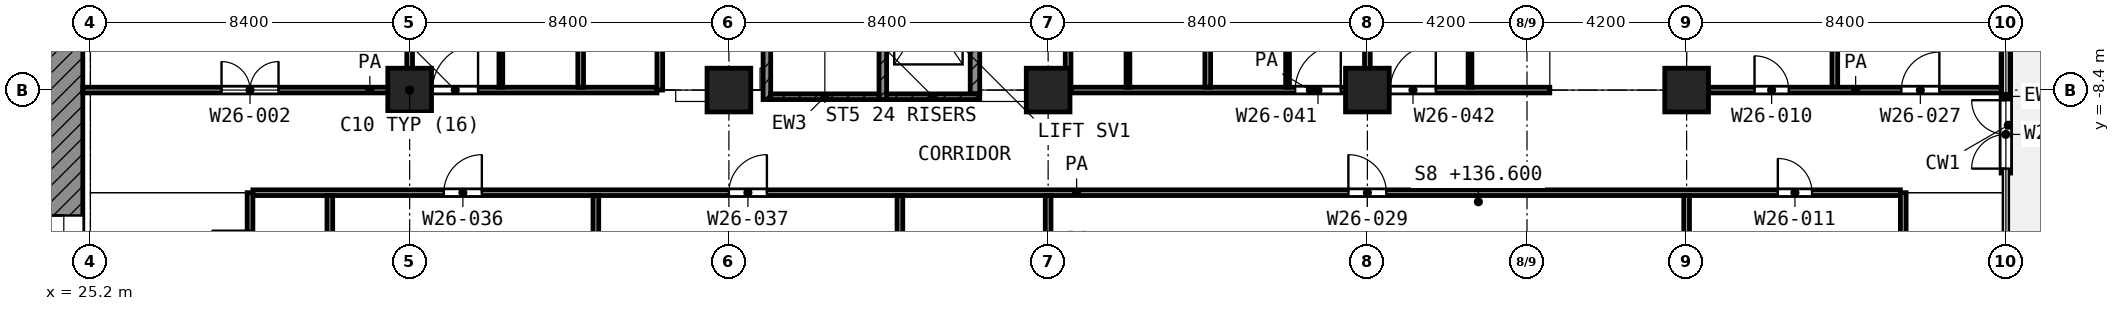
"""IFC4 building model, lengths in metres.
Left out: names, types, materials, properties, quantities, classifications, styles, units other than length and angle.
Written with IfcOpenShell. Run it as: python <this file> out.ifc"""

import sys

from ifc_helpers import new_model, si_unit, direction, frame, frame_2d, origin, origin_2d, place, context, subcontext, project, spatial, rectangle, extrude, element, fill, save


model = new_model("IFC4")
c1 = context("Model", 3, precision=1e-05, world=origin(), true_north=direction((0.0, 1.0)))
c2 = subcontext(c1, "Body", "Model", "MODEL_VIEW")
j1 = project(units=[si_unit("LENGTHUNIT", "METRE"), si_unit("PLANEANGLEUNIT", "RADIAN")], contexts=[c1])
p1 = place(None, origin())
s1 = spatial("IfcSite", under=j1, at=p1, CompositionType="ELEMENT")
p2 = place(p1, origin())
s2 = spatial("IfcBuilding", under=s1, at=p2, CompositionType="ELEMENT")
p3 = place(p2, frame((0.0, 0.0, 136.6)))
s3 = spatial("IfcBuildingStorey", under=s2, at=p3, CompositionType="ELEMENT", Elevation=136.6)
for number, where, z_axis, x_axis in (
    (1, (33.6, -8.4, 0.0), (0.0, 0.0, 1.0), (1.0, 0.0, 0.0)),
    (2, (42.0, -8.4, 0.0), (0.0, 0.0, 1.0), (1.0, 0.0, 0.0)),
    (3, (50.4, -8.4, 0.0), (0.0, 0.0, 1.0), (1.0, 0.0, 0.0)),
    (4, (58.8, -8.4, 0.0), (0.0, 0.0, 1.0), (1.0, 0.0, 0.0)),
    (5, (67.2, -8.4, 0.0), (0.0, 0.0, 1.0), (1.0, 0.0, 0.0)),
):
    element("IfcColumn", number, at=place(p3, frame(where, z_axis=z_axis, x_axis=x_axis)), inside=s3, PredefinedType="COLUMN", context=c2, shape_type="SweptSolid", body=[
        extrude(rectangle(XDim=1.15, YDim=1.15, at=origin_2d()), origin(), (0.0, 0.0, 1.0), 4.2),
    ])
p4 = place(p3, frame((75.6, -10.583, 0.0), z_axis=(0.0, 0.0, 1.0), x_axis=(0.0, 1.0, 0.0)))
e6 = element("IfcWall", 6, at=p4, inside=s3, PredefinedType="SOLIDWALL", context=c2, shape_type="SweptSolid", body=[
    extrude(rectangle(XDim=4.033, YDim=0.25, at=frame_2d((2.017, 0.0))), origin(), (0.0, 0.0, 1.0), 3.48),
])
p5 = place(p4, frame((0.117, 0.0, 0.0)))
e7 = element("IfcOpeningElement", 7, at=p5, cuts=e6, PredefinedType="OPENING", context=c2, shape_type="SweptSolid", body=[
    extrude(rectangle(XDim=1.8, YDim=2.1, at=frame_2d((0.9, 1.05))), frame((0.0, 0.135, 0.0), z_axis=(0.0, -1.0, 0.0), x_axis=(1.0, 0.0, 0.0)), (0.0, 0.0, 1.0), 0.27),
])
p6 = place(p3, frame((24.5, -24.0, 0.0), z_axis=(0.0, 0.0, 1.0), x_axis=(0.0, 1.0, 0.0)))
e8 = element("IfcWall", 8, at=p6, inside=s3, PredefinedType="SHEAR", context=c2, shape_type="SweptSolid", body=[
    extrude(rectangle(XDim=18.6, YDim=1.0, at=frame_2d((9.3, 0.0))), origin(), (0.0, 0.0, 1.0), 3.6),
])
p7 = place(p6, frame((10.5, 0.0, 0.0)))
e9 = element("IfcOpeningElement", 9, at=p7, cuts=e8, PredefinedType="OPENING", context=c2, shape_type="SweptSolid", body=[
    extrude(rectangle(XDim=1.8, YDim=2.1, at=frame_2d((0.9, 1.05))), frame((0.0, 0.51, 0.0), z_axis=(0.0, -1.0, 0.0), x_axis=(1.0, 0.0, 0.0)), (0.0, 0.0, 1.0), 1.02),
])
p8 = place(p3, frame((43.0, -8.65, 0.0), z_axis=(0.0, 0.0, 1.0), x_axis=(0.0, 1.0, 0.0)))
e10 = element("IfcWall", 10, at=p8, inside=s3, PredefinedType="SHEAR", context=c2, shape_type="SweptSolid", body=[
    extrude(rectangle(XDim=8.35, YDim=0.2, at=frame_2d((4.175, 0.0))), origin(), (0.0, 0.0, 1.0), 3.6),
])
p9 = place(p8, frame((7.0, 0.0, 0.0)))
e11 = element("IfcOpeningElement", 11, at=p9, cuts=e10, PredefinedType="OPENING", context=c2, shape_type="SweptSolid", body=[
    extrude(rectangle(XDim=1.1, YDim=2.1, at=frame_2d((0.55, 1.05))), frame((0.0, 0.11, 0.0), z_axis=(0.0, -1.0, 0.0), x_axis=(1.0, 0.0, 0.0)), (0.0, 0.0, 1.0), 0.22),
])
p10 = place(p3, frame((46.05, -8.65, 0.0), z_axis=(0.0, 0.0, 1.0), x_axis=(0.0, 1.0, 0.0)))
e12 = element("IfcWall", 12, at=p10, inside=s3, PredefinedType="SHEAR", context=c2, shape_type="SweptSolid", body=[
    extrude(rectangle(XDim=8.35, YDim=0.2, at=frame_2d((4.175, 0.0))), origin(), (0.0, 0.0, 1.0), 3.6),
])
p11 = place(p10, frame((7.0, 0.0, 0.0)))
e13 = element("IfcOpeningElement", 13, at=p11, cuts=e12, PredefinedType="OPENING", context=c2, shape_type="SweptSolid", body=[
    extrude(rectangle(XDim=1.1, YDim=2.1, at=frame_2d((0.55, 1.05))), frame((0.0, 0.11, 0.0), z_axis=(0.0, -1.0, 0.0), x_axis=(1.0, 0.0, 0.0)), (0.0, 0.0, 1.0), 0.22),
])
p12 = place(p3, frame((43.1, -8.575, 0.0), z_axis=(0.0, 0.0, 1.0), x_axis=(1.0, 0.0, 0.0)))
e14 = element("IfcWall", 14, at=p12, inside=s3, PredefinedType="SHEAR", context=c2, shape_type="SweptSolid", body=[
    extrude(rectangle(XDim=2.85, YDim=0.15, at=frame_2d((1.425, 0.0))), origin(), (0.0, 0.0, 1.0), 3.6),
])
p13 = place(p3, frame((46.15, -8.575, 0.0), z_axis=(0.0, 0.0, 1.0), x_axis=(1.0, 0.0, 0.0)))
e15 = element("IfcWall", 15, at=p13, inside=s3, PredefinedType="SHEAR", context=c2, shape_type="SweptSolid", body=[
    extrude(rectangle(XDim=2.45, YDim=0.15, at=frame_2d((1.225, 0.0))), origin(), (0.0, 0.0, 1.0), 3.6),
])
p14 = place(p3, frame((48.475, -8.5, 0.0), z_axis=(0.0, 0.0, 1.0), x_axis=(0.0, 1.0, 0.0)))
e16 = element("IfcWall", 16, at=p14, inside=s3, PredefinedType="SHEAR", context=c2, shape_type="SweptSolid", body=[
    extrude(rectangle(XDim=3.475, YDim=0.25, at=frame_2d((1.738, 0.0))), origin(), (0.0, 0.0, 1.0), 3.6),
])
p15 = place(p3, frame((36.0, -8.325, 0.0), z_axis=(0.0, 0.0, 1.0), x_axis=(0.0, 1.0, 0.0)))
e17 = element("IfcWall", 17, at=p15, inside=s3, PredefinedType="PARTITIONING", context=c2, shape_type="SweptSolid", body=[
    extrude(rectangle(XDim=2.624, YDim=0.1, at=frame_2d((1.312, 0.0))), origin(), (0.0, 0.0, 1.0), 3.6),
])
for number, where, z_axis, x_axis in (
    (18, (52.5, -8.325, 0.0), (0.0, 0.0, 1.0), (0.0, 1.0, 0.0)),
    (19, (56.7, -8.325, 0.0), (0.0, 0.0, 1.0), (0.0, 1.0, 0.0)),
    (20, (61.5, -8.325, 0.0), (0.0, 0.0, 1.0), (0.0, 1.0, 0.0)),
):
    element("IfcWall", number, at=place(p3, frame(where, z_axis=z_axis, x_axis=x_axis)), inside=s3, PredefinedType="PARTITIONING", context=c2, shape_type="SweptSolid", body=[
        extrude(rectangle(XDim=2.625, YDim=0.1, at=frame_2d((1.312, 0.0))), origin(), (0.0, 0.0, 1.0), 3.6),
    ])
p16 = place(p3, frame((29.475, -11.1, 0.0), z_axis=(0.0, 0.0, 1.0), x_axis=(1.0, 0.0, 0.0)))
e21 = element("IfcWall", 21, at=p16, inside=s3, PredefinedType="PARTITIONING", context=c2, shape_type="SweptSolid", body=[
    extrude(rectangle(XDim=43.35, YDim=0.15, at=frame_2d((21.675, 0.0))), origin(), (0.0, 0.0, 1.0), 3.6),
])
p17 = place(p16, frame((28.825, 0.0, 0.0)))
e22 = element("IfcOpeningElement", 22, at=p17, cuts=e21, PredefinedType="OPENING", context=c2, shape_type="SweptSolid", body=[
    extrude(rectangle(XDim=1.0, YDim=2.1, at=frame_2d((0.5, 1.05))), frame((0.0, 0.085, 0.0), z_axis=(0.0, -1.0, 0.0), x_axis=(1.0, 0.0, 0.0)), (0.0, 0.0, 1.0), 0.17),
])
p18 = place(p16, frame((40.125, 0.0, 0.0)))
e23 = element("IfcOpeningElement", 23, at=p18, cuts=e21, PredefinedType="OPENING", context=c2, shape_type="SweptSolid", body=[
    extrude(rectangle(XDim=0.9, YDim=2.1, at=frame_2d((0.45, 1.05))), frame((0.0, 0.085, 0.0), z_axis=(0.0, -1.0, 0.0), x_axis=(1.0, 0.0, 0.0)), (0.0, 0.0, 1.0), 0.17),
])
p19 = place(p16, frame((5.025, 0.0, 0.0)))
e24 = element("IfcOpeningElement", 24, at=p19, cuts=e21, PredefinedType="OPENING", context=c2, shape_type="SweptSolid", body=[
    extrude(rectangle(XDim=1.0, YDim=2.1, at=frame_2d((0.5, 1.05))), frame((0.0, 0.085, 0.0), z_axis=(0.0, -1.0, 0.0), x_axis=(1.0, 0.0, 0.0)), (0.0, 0.0, 1.0), 0.17),
])
p20 = place(p16, frame((12.525, 0.0, 0.0)))
e25 = element("IfcOpeningElement", 25, at=p20, cuts=e21, PredefinedType="OPENING", context=c2, shape_type="SweptSolid", body=[
    extrude(rectangle(XDim=1.0, YDim=2.1, at=frame_2d((0.5, 1.05))), frame((0.0, 0.085, 0.0), z_axis=(0.0, -1.0, 0.0), x_axis=(1.0, 0.0, 0.0)), (0.0, 0.0, 1.0), 0.17),
])
p21 = place(p3, frame((25.0, -8.4, 0.0), z_axis=(0.0, 0.0, 1.0), x_axis=(1.0, 0.0, 0.0)))
e26 = element("IfcWall", 26, at=p21, inside=s3, PredefinedType="PARTITIONING", context=c2, shape_type="SweptSolid", body=[
    extrude(rectangle(XDim=15.107, YDim=0.15, at=frame_2d((7.553, 0.0))), origin(), (0.0, 0.0, 1.0), 3.6),
])
p22 = place(p21, frame((3.65, 0.0, 0.0)))
e27 = element("IfcOpeningElement", 27, at=p22, cuts=e26, PredefinedType="OPENING", context=c2, shape_type="SweptSolid", body=[
    extrude(rectangle(XDim=1.5, YDim=2.1, at=frame_2d((0.75, 1.05))), frame((0.0, 0.085, 0.0), z_axis=(0.0, -1.0, 0.0), x_axis=(1.0, 0.0, 0.0)), (0.0, 0.0, 1.0), 0.17),
])
p23 = place(p21, frame((9.2, 0.0, 0.0)))
e28 = element("IfcOpeningElement", 28, at=p23, cuts=e26, PredefinedType="OPENING", context=c2, shape_type="SweptSolid", body=[
    extrude(rectangle(XDim=1.2, YDim=2.1, at=frame_2d((0.6, 1.05))), frame((0.0, 0.085, 0.0), z_axis=(0.0, -1.0, 0.0), x_axis=(1.0, 0.0, 0.0)), (0.0, 0.0, 1.0), 0.17),
])
p24 = place(p3, frame((51.0, -8.4, 0.0), z_axis=(0.0, 0.0, 1.0), x_axis=(1.0, 0.0, 0.0)))
e29 = element("IfcWall", 29, at=p24, inside=s3, PredefinedType="PARTITIONING", context=c2, shape_type="SweptSolid", body=[
    extrude(rectangle(XDim=12.6, YDim=0.15, at=frame_2d((6.3, 0.0))), origin(), (0.0, 0.0, 1.0), 3.6),
])
p25 = place(p24, frame((5.9, 0.0, 0.0)))
e30 = element("IfcOpeningElement", 30, at=p25, cuts=e29, PredefinedType="OPENING", context=c2, shape_type="SweptSolid", body=[
    extrude(rectangle(XDim=1.2, YDim=2.1, at=frame_2d((0.6, 1.05))), frame((0.0, 0.085, 0.0), z_axis=(0.0, -1.0, 0.0), x_axis=(1.0, 0.0, 0.0)), (0.0, 0.0, 1.0), 0.17),
])
p26 = place(p24, frame((8.4, 0.0, 0.0)))
e31 = element("IfcOpeningElement", 31, at=p26, cuts=e29, PredefinedType="OPENING", context=c2, shape_type="SweptSolid", body=[
    extrude(rectangle(XDim=1.2, YDim=2.1, at=frame_2d((0.6, 1.05))), frame((0.0, 0.085, 0.0), z_axis=(0.0, -1.0, 0.0), x_axis=(1.0, 0.0, 0.0)), (0.0, 0.0, 1.0), 0.17),
])
p27 = place(p3, frame((67.775, -8.4, 0.0), z_axis=(0.0, 0.0, 1.0), x_axis=(1.0, 0.0, 0.0)))
e32 = element("IfcWall", 32, at=p27, inside=s3, PredefinedType="PARTITIONING", context=c2, shape_type="SweptSolid", body=[
    extrude(rectangle(XDim=7.745, YDim=0.15, at=frame_2d((3.873, 0.0))), origin(), (0.0, 0.0, 1.0), 3.6),
])
p28 = place(p27, frame((1.212, 0.0, 0.0)))
e33 = element("IfcOpeningElement", 33, at=p28, cuts=e32, PredefinedType="OPENING", context=c2, shape_type="SweptSolid", body=[
    extrude(rectangle(XDim=0.9, YDim=2.1, at=frame_2d((0.45, 1.05))), frame((0.0, 0.085, 0.0), z_axis=(0.0, -1.0, 0.0), x_axis=(1.0, 0.0, 0.0)), (0.0, 0.0, 1.0), 0.17),
])
p29 = place(p27, frame((5.075, 0.0, 0.0)))
e34 = element("IfcOpeningElement", 34, at=p29, cuts=e32, PredefinedType="OPENING", context=c2, shape_type="SweptSolid", body=[
    extrude(rectangle(XDim=1.0, YDim=2.1, at=frame_2d((0.5, 1.05))), frame((0.0, 0.085, 0.0), z_axis=(0.0, -1.0, 0.0), x_axis=(1.0, 0.0, 0.0)), (0.0, 0.0, 1.0), 0.17),
])
p30 = place(p3, frame((29.4, -14.1, 0.0), z_axis=(0.0, 0.0, 1.0), x_axis=(0.0, 1.0, 0.0)))
e35 = element("IfcWall", 35, at=p30, inside=s3, PredefinedType="PARTITIONING", context=c2, shape_type="SweptSolid", body=[
    extrude(rectangle(XDim=3.0, YDim=0.15, at=frame_2d((1.5, 0.0))), origin(), (0.0, 0.0, 1.0), 3.6),
])
p31 = place(p30, frame((1.0, 0.0, 0.0)))
e36 = element("IfcOpeningElement", 36, at=p31, cuts=e35, PredefinedType="OPENING", context=c2, shape_type="SweptSolid", body=[
    extrude(rectangle(XDim=1.0, YDim=2.1, at=frame_2d((0.5, 1.05))), frame((0.0, 0.085, 0.0), z_axis=(0.0, -1.0, 0.0), x_axis=(1.0, 0.0, 0.0)), (0.0, 0.0, 1.0), 0.17),
])
p32 = place(p3, frame((31.5, -14.025, 0.0), z_axis=(0.0, 0.0, 1.0), x_axis=(0.0, 1.0, 0.0)))
e37 = element("IfcWall", 37, at=p32, inside=s3, PredefinedType="PARTITIONING", context=c2, shape_type="SweptSolid", body=[
    extrude(rectangle(XDim=2.85, YDim=0.15, at=frame_2d((1.425, 0.0))), origin(), (0.0, 0.0, 1.0), 3.6),
])
for number, where, z_axis, x_axis in (
    (38, (33.6, -8.325, 0.0), (0.0, 0.0, 1.0), (0.0, 1.0, 0.0)),
    (39, (38.1, -8.325, 0.0), (0.0, 0.0, 1.0), (0.0, 1.0, 0.0)),
):
    element("IfcWall", number, at=place(p3, frame(where, z_axis=z_axis, x_axis=x_axis)), inside=s3, PredefinedType="PARTITIONING", context=c2, shape_type="SweptSolid", body=[
        extrude(rectangle(XDim=8.322, YDim=0.15, at=frame_2d((4.161, 0.0))), origin(), (0.0, 0.0, 1.0), 3.6),
    ])
p33 = place(p3, frame((38.5, -14.025, 0.0), z_axis=(0.0, 0.0, 1.0), x_axis=(0.0, 1.0, 0.0)))
e40 = element("IfcWall", 40, at=p33, inside=s3, PredefinedType="PARTITIONING", context=c2, shape_type="SweptSolid", body=[
    extrude(rectangle(XDim=2.85, YDim=0.15, at=frame_2d((1.425, 0.0))), origin(), (0.0, 0.0, 1.0), 3.6),
])
p34 = place(p3, frame((40.182, -8.4, 0.0), z_axis=(0.0, 0.0, 1.0), x_axis=(0.0, 1.0, 0.0)))
e41 = element("IfcWall", 41, at=p34, inside=s3, PredefinedType="PARTITIONING", context=c2, shape_type="SweptSolid", body=[
    extrude(rectangle(XDim=8.05, YDim=0.15, at=frame_2d((4.025, 0.0))), origin(), (0.0, 0.0, 1.0), 3.6),
])
p35 = place(p34, frame((3.575, 0.0, 0.0)))
e42 = element("IfcOpeningElement", 42, at=p35, cuts=e41, PredefinedType="OPENING", context=c2, shape_type="SweptSolid", body=[
    extrude(rectangle(XDim=0.9, YDim=2.1, at=frame_2d((0.45, 1.05))), frame((0.0, 0.085, 0.0), z_axis=(0.0, -1.0, 0.0), x_axis=(1.0, 0.0, 0.0)), (0.0, 0.0, 1.0), 0.17),
])
for number, where, z_axis, x_axis in (
    (43, (46.5, -14.025, 0.0), (0.0, 0.0, 1.0), (0.0, 1.0, 0.0)),
    (44, (50.4, -14.025, 0.0), (0.0, 0.0, 1.0), (0.0, 1.0, 0.0)),
):
    element("IfcWall", number, at=place(p3, frame(where, z_axis=z_axis, x_axis=x_axis)), inside=s3, PredefinedType="PARTITIONING", context=c2, shape_type="SweptSolid", body=[
        extrude(rectangle(XDim=2.85, YDim=0.15, at=frame_2d((1.425, 0.0))), origin(), (0.0, 0.0, 1.0), 3.6),
    ])
p36 = place(p3, frame((50.925, -8.4, 0.0), z_axis=(0.0, 0.0, 1.0), x_axis=(0.0, 1.0, 0.0)))
e45 = element("IfcWall", 45, at=p36, inside=s3, PredefinedType="PARTITIONING", context=c2, shape_type="SweptSolid", body=[
    extrude(rectangle(XDim=6.548, YDim=0.15, at=frame_2d((3.274, 0.0))), origin(), (0.0, 0.0, 1.0), 3.6),
])
p37 = place(p36, frame((3.765, 0.0, 0.0)))
e46 = element("IfcOpeningElement", 46, at=p37, cuts=e45, PredefinedType="OPENING", context=c2, shape_type="SweptSolid", body=[
    extrude(rectangle(XDim=1.2, YDim=2.1, at=frame_2d((0.6, 1.05))), frame((0.0, 0.085, 0.0), z_axis=(0.0, -1.0, 0.0), x_axis=(1.0, 0.0, 0.0)), (0.0, 0.0, 1.0), 0.17),
])
p38 = place(p36, frame((1.583, 0.0, 0.0)))
e47 = element("IfcOpeningElement", 47, at=p38, cuts=e45, PredefinedType="OPENING", context=c2, shape_type="SweptSolid", body=[
    extrude(rectangle(XDim=1.2, YDim=2.1, at=frame_2d((0.6, 1.05))), frame((0.0, 0.085, 0.0), z_axis=(0.0, -1.0, 0.0), x_axis=(1.0, 0.0, 0.0)), (0.0, 0.0, 1.0), 0.17),
])
p39 = place(p3, frame((54.6, -8.325, 0.0), z_axis=(0.0, 0.0, 1.0), x_axis=(0.0, 1.0, 0.0)))
e48 = element("IfcWall", 48, at=p39, inside=s3, PredefinedType="PARTITIONING", context=c2, shape_type="SweptSolid", body=[
    extrude(rectangle(XDim=8.323, YDim=0.15, at=frame_2d((4.162, 0.0))), origin(), (0.0, 0.0, 1.0), 3.6),
])
p40 = place(p3, frame((58.8, -8.325, 0.0), z_axis=(0.0, 0.0, 1.0), x_axis=(0.0, 1.0, 0.0)))
e49 = element("IfcWall", 49, at=p40, inside=s3, PredefinedType="PARTITIONING", context=c2, shape_type="SweptSolid", body=[
    extrude(rectangle(XDim=8.325, YDim=0.15, at=frame_2d((4.163, 0.0))), origin(), (0.0, 0.0, 1.0), 3.6),
])
p41 = place(p3, frame((67.2, -14.025, 0.0), z_axis=(0.0, 0.0, 1.0), x_axis=(0.0, 1.0, 0.0)))
e50 = element("IfcWall", 50, at=p41, inside=s3, PredefinedType="PARTITIONING", context=c2, shape_type="SweptSolid", body=[
    extrude(rectangle(XDim=2.85, YDim=0.15, at=frame_2d((1.425, 0.0))), origin(), (0.0, 0.0, 1.0), 3.6),
])
p42 = place(p3, frame((71.1, -8.325, 0.0), z_axis=(0.0, 0.0, 1.0), x_axis=(0.0, 1.0, 0.0)))
e51 = element("IfcWall", 51, at=p42, inside=s3, PredefinedType="PARTITIONING", context=c2, shape_type="SweptSolid", body=[
    extrude(rectangle(XDim=8.325, YDim=0.15, at=frame_2d((4.163, 0.0))), origin(), (0.0, 0.0, 1.0), 3.6),
])
p43 = place(p3, frame((72.9, -14.1, 0.0), z_axis=(0.0, 0.0, 1.0), x_axis=(0.0, 1.0, 0.0)))
e52 = element("IfcWall", 52, at=p43, inside=s3, PredefinedType="PARTITIONING", context=c2, shape_type="SweptSolid", body=[
    extrude(rectangle(XDim=3.0, YDim=0.15, at=frame_2d((1.5, 0.0))), origin(), (0.0, 0.0, 1.0), 3.6),
])
p44 = place(p5, origin())
e53 = element("IfcDoor", 53, at=p44, inside=s3, OperationType="DOUBLE_DOOR_SINGLE_SWING", PredefinedType="DOOR", context=c2, shape_type="SweptSolid", body=[
    extrude(rectangle(XDim=1.8, YDim=2.1, at=frame_2d((0.9, 1.05))), frame((0.0, 0.025, 0.0), z_axis=(0.0, -1.0, 0.0), x_axis=(1.0, 0.0, 0.0)), (0.0, 0.0, 1.0), 0.05),
])
fill(e7, e53)
p45 = place(p7, origin())
e54 = element("IfcDoor", 54, at=p45, inside=s3, OperationType="DOUBLE_DOOR_SINGLE_SWING", PredefinedType="DOOR", context=c2, shape_type="SweptSolid", body=[
    extrude(rectangle(XDim=1.8, YDim=2.1, at=frame_2d((0.9, 1.05))), frame((0.0, 0.025, 0.0), z_axis=(0.0, -1.0, 0.0), x_axis=(1.0, 0.0, 0.0)), (0.0, 0.0, 1.0), 0.05),
])
fill(e9, e54)
p46 = place(p22, origin())
e55 = element("IfcDoor", 55, at=p46, inside=s3, OperationType="DOUBLE_DOOR_SINGLE_SWING", PredefinedType="DOOR", context=c2, shape_type="SweptSolid", body=[
    extrude(rectangle(XDim=1.5, YDim=2.1, at=frame_2d((0.75, 1.05))), frame((0.0, 0.025, 0.0), z_axis=(0.0, -1.0, 0.0), x_axis=(1.0, 0.0, 0.0)), (0.0, 0.0, 1.0), 0.05),
])
fill(e27, e55)
p47 = place(p23, origin())
e56 = element("IfcDoor", 56, at=p47, inside=s3, OperationType="SINGLE_SWING_RIGHT", PredefinedType="DOOR", context=c2, shape_type="SweptSolid", body=[
    extrude(rectangle(XDim=1.2, YDim=2.1, at=frame_2d((0.6, 1.05))), frame((0.0, 0.025, 0.0), z_axis=(0.0, -1.0, 0.0), x_axis=(1.0, 0.0, 0.0)), (0.0, 0.0, 1.0), 0.05),
])
fill(e28, e56)
p48 = place(p25, origin())
e57 = element("IfcDoor", 57, at=p48, inside=s3, OperationType="SINGLE_SWING_RIGHT", PredefinedType="DOOR", context=c2, shape_type="SweptSolid", body=[
    extrude(rectangle(XDim=1.2, YDim=2.1, at=frame_2d((0.6, 1.05))), frame((0.0, 0.025, 0.0), z_axis=(0.0, -1.0, 0.0), x_axis=(1.0, 0.0, 0.0)), (0.0, 0.0, 1.0), 0.05),
])
fill(e30, e57)
p49 = place(p26, origin())
e58 = element("IfcDoor", 58, at=p49, inside=s3, OperationType="SINGLE_SWING_RIGHT", PredefinedType="DOOR", context=c2, shape_type="SweptSolid", body=[
    extrude(rectangle(XDim=1.2, YDim=2.1, at=frame_2d((0.6, 1.05))), frame((0.0, 0.025, 0.0), z_axis=(0.0, -1.0, 0.0), x_axis=(1.0, 0.0, 0.0)), (0.0, 0.0, 1.0), 0.05),
])
fill(e31, e58)
p50 = place(p28, origin())
e59 = element("IfcDoor", 59, at=p50, inside=s3, OperationType="SINGLE_SWING_LEFT", PredefinedType="DOOR", context=c2, shape_type="SweptSolid", body=[
    extrude(rectangle(XDim=0.9, YDim=2.1, at=frame_2d((0.45, 1.05))), frame((0.0, 0.025, 0.0), z_axis=(0.0, -1.0, 0.0), x_axis=(1.0, 0.0, 0.0)), (0.0, 0.0, 1.0), 0.05),
])
fill(e33, e59)
p51 = place(p29, origin())
e60 = element("IfcDoor", 60, at=p51, inside=s3, OperationType="SINGLE_SWING_RIGHT", PredefinedType="DOOR", context=c2, shape_type="SweptSolid", body=[
    extrude(rectangle(XDim=1.0, YDim=2.1, at=frame_2d((0.5, 1.05))), frame((0.0, 0.025, 0.0), z_axis=(0.0, -1.0, 0.0), x_axis=(1.0, 0.0, 0.0)), (0.0, 0.0, 1.0), 0.05),
])
fill(e34, e60)
p52 = place(p17, origin())
e61 = element("IfcDoor", 61, at=p52, inside=s3, OperationType="SINGLE_SWING_LEFT", PredefinedType="DOOR", context=c2, shape_type="SweptSolid", body=[
    extrude(rectangle(XDim=1.0, YDim=2.1, at=frame_2d((0.5, 1.05))), frame((0.0, 0.025, 0.0), z_axis=(0.0, -1.0, 0.0), x_axis=(1.0, 0.0, 0.0)), (0.0, 0.0, 1.0), 0.05),
])
fill(e22, e61)
p53 = place(p18, origin())
e62 = element("IfcDoor", 62, at=p53, inside=s3, OperationType="SINGLE_SWING_LEFT", PredefinedType="DOOR", context=c2, shape_type="SweptSolid", body=[
    extrude(rectangle(XDim=0.9, YDim=2.1, at=frame_2d((0.45, 1.05))), frame((0.0, 0.025, 0.0), z_axis=(0.0, -1.0, 0.0), x_axis=(1.0, 0.0, 0.0)), (0.0, 0.0, 1.0), 0.05),
])
fill(e23, e62)
p54 = place(p19, origin())
e63 = element("IfcDoor", 63, at=p54, inside=s3, OperationType="SINGLE_SWING_RIGHT", PredefinedType="DOOR", context=c2, shape_type="SweptSolid", body=[
    extrude(rectangle(XDim=1.0, YDim=2.1, at=frame_2d((0.5, 1.05))), frame((0.0, 0.025, 0.0), z_axis=(0.0, -1.0, 0.0), x_axis=(1.0, 0.0, 0.0)), (0.0, 0.0, 1.0), 0.05),
])
fill(e24, e63)
p55 = place(p20, origin())
e64 = element("IfcDoor", 64, at=p55, inside=s3, OperationType="SINGLE_SWING_RIGHT", PredefinedType="DOOR", context=c2, shape_type="SweptSolid", body=[
    extrude(rectangle(XDim=1.0, YDim=2.1, at=frame_2d((0.5, 1.05))), frame((0.0, 0.025, 0.0), z_axis=(0.0, -1.0, 0.0), x_axis=(1.0, 0.0, 0.0)), (0.0, 0.0, 1.0), 0.05),
])
fill(e25, e64)
save(model, sys.argv[1])
